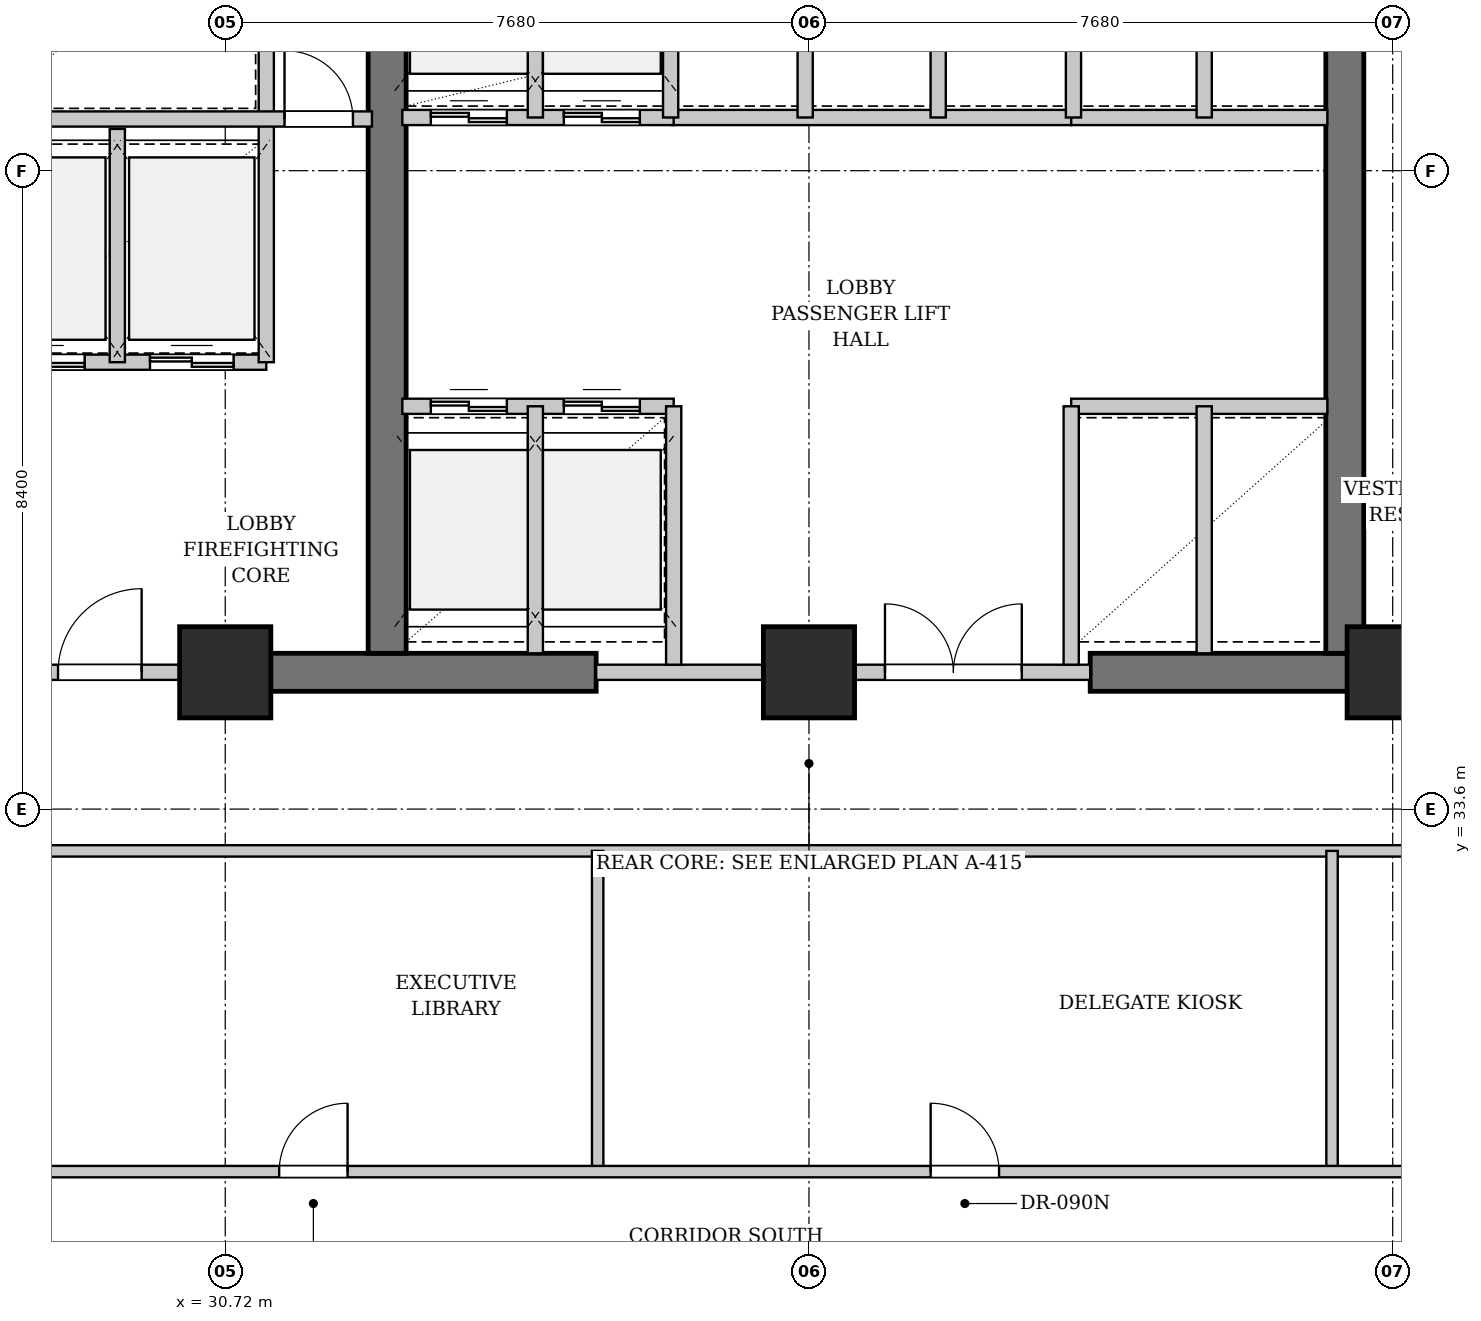
"""IFC4 building model, lengths in metres.
Left out: names, types, materials, properties, quantities, classifications, styles, units other than length and angle.
Written with IfcOpenShell. Run it as: python <this file> out.ifc"""

import sys

from ifc_helpers import new_model, si_unit, direction, frame, frame_2d, origin, origin_2d, place, context, subcontext, project, spatial, rectangle, extrude, element, fill, save


model = new_model("IFC4")
c1 = context("Model", 3, precision=1e-05, world=origin(), true_north=direction((0.0, 1.0)))
c2 = subcontext(c1, "Body", "Model", "MODEL_VIEW")
j1 = project(units=[si_unit("LENGTHUNIT", "METRE"), si_unit("PLANEANGLEUNIT", "RADIAN")], contexts=[c1])
p1 = place(None, origin())
s1 = spatial("IfcSite", under=j1, at=p1, CompositionType="ELEMENT")
p2 = place(p1, origin())
s2 = spatial("IfcBuilding", under=s1, at=p2, CompositionType="ELEMENT")
p3 = place(p2, frame((0.0, 0.0, 54.2)))
s3 = spatial("IfcBuildingStorey", under=s2, at=p3, CompositionType="ELEMENT", Elevation=54.2)
p4 = place(p3, frame((30.72, 35.4, 0.0), z_axis=(0.0, 0.0, 1.0), x_axis=(1.0, 0.0, 0.0)))
e1 = element("IfcWall", 1, at=p4, inside=s3, PredefinedType="SHEAR", context=c2, shape_type="SweptSolid", body=[
    extrude(rectangle(XDim=4.88, YDim=0.5, at=frame_2d((2.44, 0.0))), origin(), (0.0, 0.0, 1.0), 3.18),
])
p5 = place(p3, frame((42.1, 35.4, 0.0), z_axis=(0.0, 0.0, 1.0), x_axis=(1.0, 0.0, 0.0)))
e2 = element("IfcWall", 2, at=p5, inside=s3, PredefinedType="SHEAR", context=c2, shape_type="SweptSolid", body=[
    extrude(rectangle(XDim=8.05, YDim=0.5, at=frame_2d((4.025, 0.0))), origin(), (0.0, 0.0, 1.0), 3.18),
])
p6 = place(p5, frame((4.85, 0.0, 0.0)))
e3 = element("IfcOpeningElement", 3, at=p6, cuts=e2, PredefinedType="OPENING", context=c2, shape_type="SweptSolid", body=[
    extrude(rectangle(XDim=0.9, YDim=2.15, at=frame_2d((0.45, 1.075))), frame((0.0, 0.26, 0.0), z_axis=(0.0, -1.0, 0.0), x_axis=(1.0, 0.0, 0.0)), (0.0, 0.0, 1.0), 0.52),
])
for number, where, z_axis, x_axis in (
    (4, (32.85, 35.65, 0.0), (0.0, 0.0, 1.0), (0.0, 1.0, 0.0)),
    (5, (45.45, 35.65, 0.0), (0.0, 0.0, 1.0), (0.0, 1.0, 0.0)),
):
    element("IfcWall", number, at=place(p3, frame(where, z_axis=z_axis, x_axis=x_axis)), inside=s3, PredefinedType="SHEAR", context=c2, shape_type="SweptSolid", body=[
        extrude(rectangle(XDim=10.3, YDim=0.5, at=frame_2d((5.15, 0.0))), origin(), (0.0, 0.0, 1.0), 3.18),
    ])
for number, where, z_axis, x_axis in (
    (6, (30.72, 35.4, 0.0), (0.0, 0.0, 1.0), (1.0, 0.0, 0.0)),
    (7, (38.4, 35.4, 0.0), (0.0, 0.0, 1.0), (1.0, 0.0, 0.0)),
    (8, (46.08, 35.4, 0.0), (0.0, 0.0, 1.0), (1.0, 0.0, 0.0)),
):
    element("IfcColumn", number, at=place(p3, frame(where, z_axis=z_axis, x_axis=x_axis)), inside=s3, PredefinedType="COLUMN", context=c2, shape_type="SweptSolid", body=[
        extrude(rectangle(XDim=1.2, YDim=1.2, at=origin_2d()), origin(), (0.0, 0.0, 1.0), 3.4),
    ])
p7 = place(p3, frame((28.22, 35.4, 0.0), z_axis=(0.0, 0.0, 1.0), x_axis=(1.0, 0.0, 0.0)))
e9 = element("IfcWall", 9, at=p7, inside=s3, PredefinedType="PARTITIONING", context=c2, shape_type="SweptSolid", body=[
    extrude(rectangle(XDim=2.5, YDim=0.2, at=frame_2d((1.25, 0.0))), origin(), (0.0, 0.0, 1.0), 2.475),
])
p8 = place(p7, frame((0.3, 0.0, 0.0)))
e10 = element("IfcOpeningElement", 10, at=p8, cuts=e9, PredefinedType="OPENING", context=c2, shape_type="SweptSolid", body=[
    extrude(rectangle(XDim=1.1, YDim=2.15, at=frame_2d((0.55, 1.075))), frame((0.0, 0.11, 0.0), z_axis=(0.0, -1.0, 0.0), x_axis=(1.0, 0.0, 0.0)), (0.0, 0.0, 1.0), 0.22),
])
p9 = place(p3, frame((27.32, 39.48, 0.0), z_axis=(0.0, 0.0, 1.0), x_axis=(1.0, 0.0, 0.0)))
e11 = element("IfcWall", 11, at=p9, inside=s3, PredefinedType="PARTITIONING", context=c2, shape_type="SweptSolid", body=[
    extrude(rectangle(XDim=3.94, YDim=0.2, at=frame_2d((1.97, 0.0))), origin(), (0.0, 0.0, 1.0), 3.18),
])
p10 = place(p9, frame((0.45, 0.0, 0.0)))
e12 = element("IfcOpeningElement", 12, at=p10, cuts=e11, PredefinedType="OPENING", context=c2, shape_type="SweptSolid", body=[
    extrude(rectangle(XDim=1.1, YDim=2.2, at=frame_2d((0.55, 1.1))), frame((0.0, 0.11, 0.0), z_axis=(0.0, -1.0, 0.0), x_axis=(1.0, 0.0, 0.0)), (0.0, 0.0, 1.0), 0.22),
])
p11 = place(p9, frame((2.41, 0.0, 0.0)))
e13 = element("IfcOpeningElement", 13, at=p11, cuts=e11, PredefinedType="OPENING", context=c2, shape_type="SweptSolid", body=[
    extrude(rectangle(XDim=1.1, YDim=2.2, at=frame_2d((0.55, 1.1))), frame((0.0, 0.11, 0.0), z_axis=(0.0, -1.0, 0.0), x_axis=(1.0, 0.0, 0.0)), (0.0, 0.0, 1.0), 0.22),
])
p12 = place(p3, frame((29.3, 39.48, 0.0), z_axis=(0.0, 0.0, 1.0), x_axis=(0.0, 1.0, 0.0)))
e14 = element("IfcWall", 14, at=p12, inside=s3, PredefinedType="PARTITIONING", context=c2, shape_type="SweptSolid", body=[
    extrude(rectangle(XDim=3.07, YDim=0.2, at=frame_2d((1.535, 0.0))), origin(), (0.0, 0.0, 1.0), 3.18),
])
p13 = place(p3, frame((31.26, 39.48, 0.0), z_axis=(0.0, 0.0, 1.0), x_axis=(0.0, 1.0, 0.0)))
e15 = element("IfcWall", 15, at=p13, inside=s3, PredefinedType="PARTITIONING", context=c2, shape_type="SweptSolid", body=[
    extrude(rectangle(XDim=6.44, YDim=0.2, at=frame_2d((3.22, 0.0))), origin(), (0.0, 0.0, 1.0), 3.18),
])
p14 = place(p3, frame((27.32, 42.68, 0.0), z_axis=(0.0, 0.0, 1.0), x_axis=(1.0, 0.0, 0.0)))
e16 = element("IfcWall", 16, at=p14, inside=s3, PredefinedType="PARTITIONING", context=c2, shape_type="SweptSolid", body=[
    extrude(rectangle(XDim=5.33, YDim=0.2, at=frame_2d((2.665, 0.0))), origin(), (0.0, 0.0, 1.0), 3.18),
])
p15 = place(p14, frame((4.18, 0.0, 0.0)))
e17 = element("IfcOpeningElement", 17, at=p15, cuts=e16, PredefinedType="OPENING", context=c2, shape_type="SweptSolid", body=[
    extrude(rectangle(XDim=0.9, YDim=2.15, at=frame_2d((0.45, 1.075))), frame((0.0, 0.11, 0.0), z_axis=(0.0, -1.0, 0.0), x_axis=(1.0, 0.0, 0.0)), (0.0, 0.0, 1.0), 0.22),
])
p16 = place(p3, frame((35.6, 35.4, 0.0), z_axis=(0.0, 0.0, 1.0), x_axis=(1.0, 0.0, 0.0)))
e18 = element("IfcWall", 18, at=p16, inside=s3, PredefinedType="PARTITIONING", context=c2, shape_type="SweptSolid", body=[
    extrude(rectangle(XDim=6.5, YDim=0.2, at=frame_2d((3.25, 0.0))), origin(), (0.0, 0.0, 1.0), 2.475),
])
p17 = place(p16, frame((3.8, 0.0, 0.0)))
e19 = element("IfcOpeningElement", 19, at=p17, cuts=e18, PredefinedType="OPENING", context=c2, shape_type="SweptSolid", body=[
    extrude(rectangle(XDim=1.8, YDim=2.3, at=frame_2d((0.9, 1.15))), frame((0.0, 0.11, 0.0), z_axis=(0.0, -1.0, 0.0), x_axis=(1.0, 0.0, 0.0)), (0.0, 0.0, 1.0), 0.22),
])
p18 = place(p3, frame((36.6, 42.7, 0.0), z_axis=(0.0, 0.0, 1.0), x_axis=(1.0, 0.0, 0.0)))
e20 = element("IfcWall", 20, at=p18, inside=s3, PredefinedType="PARTITIONING", context=c2, shape_type="SweptSolid", body=[
    extrude(rectangle(XDim=5.25, YDim=0.2, at=frame_2d((2.625, 0.0))), origin(), (0.0, 0.0, 1.0), 3.18),
])
p19 = place(p3, frame((38.35, 42.7, 0.0), z_axis=(0.0, 0.0, 1.0), x_axis=(0.0, 1.0, 0.0)))
e21 = element("IfcWall", 21, at=p19, inside=s3, PredefinedType="PARTITIONING", context=c2, shape_type="SweptSolid", body=[
    extrude(rectangle(XDim=3.22, YDim=0.2, at=frame_2d((1.61, 0.0))), origin(), (0.0, 0.0, 1.0), 2.475),
])
p20 = place(p3, frame((40.1, 42.7, 0.0), z_axis=(0.0, 0.0, 1.0), x_axis=(0.0, 1.0, 0.0)))
e22 = element("IfcWall", 22, at=p20, inside=s3, PredefinedType="PARTITIONING", context=c2, shape_type="SweptSolid", body=[
    extrude(rectangle(XDim=3.22, YDim=0.2, at=frame_2d((1.61, 0.0))), origin(), (0.0, 0.0, 1.0), 3.18),
])
p21 = place(p3, frame((33.05, 38.9, 0.0), z_axis=(0.0, 0.0, 1.0), x_axis=(1.0, 0.0, 0.0)))
e23 = element("IfcWall", 23, at=p21, inside=s3, PredefinedType="PARTITIONING", context=c2, shape_type="SweptSolid", body=[
    extrude(rectangle(XDim=3.57, YDim=0.2, at=frame_2d((1.785, 0.0))), origin(), (0.0, 0.0, 1.0), 3.18),
])
p22 = place(p21, frame((0.375, 0.0, 0.0)))
e24 = element("IfcOpeningElement", 24, at=p22, cuts=e23, PredefinedType="OPENING", context=c2, shape_type="SweptSolid", body=[
    extrude(rectangle(XDim=1.0, YDim=2.2, at=frame_2d((0.5, 1.1))), frame((0.0, 0.11, 0.0), z_axis=(0.0, -1.0, 0.0), x_axis=(1.0, 0.0, 0.0)), (0.0, 0.0, 1.0), 0.22),
])
p23 = place(p21, frame((2.125, 0.0, 0.0)))
e25 = element("IfcOpeningElement", 25, at=p23, cuts=e23, PredefinedType="OPENING", context=c2, shape_type="SweptSolid", body=[
    extrude(rectangle(XDim=1.0, YDim=2.2, at=frame_2d((0.5, 1.1))), frame((0.0, 0.11, 0.0), z_axis=(0.0, -1.0, 0.0), x_axis=(1.0, 0.0, 0.0)), (0.0, 0.0, 1.0), 0.22),
])
p24 = place(p3, frame((33.05, 42.7, 0.0), z_axis=(0.0, 0.0, 1.0), x_axis=(1.0, 0.0, 0.0)))
e26 = element("IfcWall", 26, at=p24, inside=s3, PredefinedType="PARTITIONING", context=c2, shape_type="SweptSolid", body=[
    extrude(rectangle(XDim=3.57, YDim=0.2, at=frame_2d((1.785, 0.0))), origin(), (0.0, 0.0, 1.0), 3.18),
])
p25 = place(p24, frame((0.375, 0.0, 0.0)))
e27 = element("IfcOpeningElement", 27, at=p25, cuts=e26, PredefinedType="OPENING", context=c2, shape_type="SweptSolid", body=[
    extrude(rectangle(XDim=1.0, YDim=2.2, at=frame_2d((0.5, 1.1))), frame((0.0, 0.11, 0.0), z_axis=(0.0, -1.0, 0.0), x_axis=(1.0, 0.0, 0.0)), (0.0, 0.0, 1.0), 0.22),
])
p26 = place(p24, frame((2.125, 0.0, 0.0)))
e28 = element("IfcOpeningElement", 28, at=p26, cuts=e26, PredefinedType="OPENING", context=c2, shape_type="SweptSolid", body=[
    extrude(rectangle(XDim=1.0, YDim=2.2, at=frame_2d((0.5, 1.1))), frame((0.0, 0.11, 0.0), z_axis=(0.0, -1.0, 0.0), x_axis=(1.0, 0.0, 0.0)), (0.0, 0.0, 1.0), 0.22),
])
p27 = place(p3, frame((34.8, 35.65, 0.0), z_axis=(0.0, 0.0, 1.0), x_axis=(0.0, 1.0, 0.0)))
e29 = element("IfcWall", 29, at=p27, inside=s3, PredefinedType="PARTITIONING", context=c2, shape_type="SweptSolid", body=[
    extrude(rectangle(XDim=3.25, YDim=0.2, at=frame_2d((1.625, 0.0))), origin(), (0.0, 0.0, 1.0), 3.18),
])
p28 = place(p3, frame((34.8, 42.7, 0.0), z_axis=(0.0, 0.0, 1.0), x_axis=(0.0, 1.0, 0.0)))
e30 = element("IfcWall", 30, at=p28, inside=s3, PredefinedType="PARTITIONING", context=c2, shape_type="SweptSolid", body=[
    extrude(rectangle(XDim=3.22, YDim=0.2, at=frame_2d((1.61, 0.0))), origin(), (0.0, 0.0, 1.0), 3.18),
])
p29 = place(p3, frame((36.62, 35.5, 0.0), z_axis=(0.0, 0.0, 1.0), x_axis=(0.0, 1.0, 0.0)))
e31 = element("IfcWall", 31, at=p29, inside=s3, PredefinedType="PARTITIONING", context=c2, shape_type="SweptSolid", body=[
    extrude(rectangle(XDim=3.4, YDim=0.2, at=frame_2d((1.7, 0.0))), origin(), (0.0, 0.0, 1.0), 3.18),
])
p30 = place(p3, frame((36.58, 42.7, 0.0), z_axis=(0.0, 0.0, 1.0), x_axis=(0.0, 1.0, 0.0)))
e32 = element("IfcWall", 32, at=p30, inside=s3, PredefinedType="PARTITIONING", context=c2, shape_type="SweptSolid", body=[
    extrude(rectangle(XDim=3.22, YDim=0.2, at=frame_2d((1.61, 0.0))), origin(), (0.0, 0.0, 1.0), 3.18),
])
for number, where, z_axis, x_axis in (
    (33, (41.85, 38.9, 0.0), (0.0, 0.0, 1.0), (1.0, 0.0, 0.0)),
    (34, (41.85, 42.7, 0.0), (0.0, 0.0, 1.0), (1.0, 0.0, 0.0)),
):
    element("IfcWall", number, at=place(p3, frame(where, z_axis=z_axis, x_axis=x_axis)), inside=s3, PredefinedType="PARTITIONING", context=c2, shape_type="SweptSolid", body=[
        extrude(rectangle(XDim=3.37, YDim=0.2, at=frame_2d((1.685, 0.0))), origin(), (0.0, 0.0, 1.0), 3.18),
    ])
p31 = place(p3, frame((43.6, 35.65, 0.0), z_axis=(0.0, 0.0, 1.0), x_axis=(0.0, 1.0, 0.0)))
e35 = element("IfcWall", 35, at=p31, inside=s3, PredefinedType="PARTITIONING", context=c2, shape_type="SweptSolid", body=[
    extrude(rectangle(XDim=3.25, YDim=0.2, at=frame_2d((1.625, 0.0))), origin(), (0.0, 0.0, 1.0), 3.18),
])
p32 = place(p3, frame((43.6, 42.7, 0.0), z_axis=(0.0, 0.0, 1.0), x_axis=(0.0, 1.0, 0.0)))
e36 = element("IfcWall", 36, at=p32, inside=s3, PredefinedType="PARTITIONING", context=c2, shape_type="SweptSolid", body=[
    extrude(rectangle(XDim=3.22, YDim=0.2, at=frame_2d((1.61, 0.0))), origin(), (0.0, 0.0, 1.0), 3.18),
])
p33 = place(p3, frame((41.85, 35.5, 0.0), z_axis=(0.0, 0.0, 1.0), x_axis=(0.0, 1.0, 0.0)))
e37 = element("IfcWall", 37, at=p33, inside=s3, PredefinedType="PARTITIONING", context=c2, shape_type="SweptSolid", body=[
    extrude(rectangle(XDim=3.4, YDim=0.2, at=frame_2d((1.7, 0.0))), origin(), (0.0, 0.0, 1.0), 3.18),
])
p34 = place(p3, frame((41.88, 42.7, 0.0), z_axis=(0.0, 0.0, 1.0), x_axis=(0.0, 1.0, 0.0)))
e38 = element("IfcWall", 38, at=p34, inside=s3, PredefinedType="PARTITIONING", context=c2, shape_type="SweptSolid", body=[
    extrude(rectangle(XDim=3.22, YDim=0.2, at=frame_2d((1.61, 0.0))), origin(), (0.0, 0.0, 1.0), 3.18),
])
p35 = place(p3, frame((22.83, 33.05, 0.0), z_axis=(0.0, 0.0, 1.0), x_axis=(1.0, 0.0, 0.0)))
e39 = element("IfcWall", 39, at=p35, inside=s3, PredefinedType="PARTITIONING", context=c2, shape_type="SweptSolid", body=[
    extrude(rectangle(XDim=31.19, YDim=0.15, at=frame_2d((15.595, 0.0))), origin(), (0.0, 0.0, 1.0), 3.18),
])
for number, where, z_axis, x_axis in (
    (40, (35.62, 28.83, 0.0), (0.0, 0.0, 1.0), (0.0, 1.0, 0.0)),
    (41, (45.282, 28.83, 0.0), (0.0, 0.0, 1.0), (0.0, 1.0, 0.0)),
):
    element("IfcWall", number, at=place(p3, frame(where, z_axis=z_axis, x_axis=x_axis)), inside=s3, PredefinedType="PARTITIONING", context=c2, shape_type="SweptSolid", body=[
        extrude(rectangle(XDim=4.22, YDim=0.15, at=frame_2d((2.11, 0.0))), origin(), (0.0, 0.0, 1.0), 3.18),
    ])
p36 = place(p3, frame((22.84, 28.83, 0.0), z_axis=(0.0, 0.0, 1.0), x_axis=(1.0, 0.0, 0.0)))
e42 = element("IfcWall", 42, at=p36, inside=s3, PredefinedType="PARTITIONING", context=c2, shape_type="SweptSolid", body=[
    extrude(rectangle(XDim=31.17, YDim=0.15, at=frame_2d((15.585, 0.0))), origin(), (0.0, 0.0, 1.0), 3.18),
])
p37 = place(p36, frame((2.199, 0.0, 0.0)))
e43 = element("IfcOpeningElement", 43, at=p37, cuts=e42, PredefinedType="OPENING", context=c2, shape_type="SweptSolid", body=[
    extrude(rectangle(XDim=0.9, YDim=2.15, at=frame_2d((0.45, 1.075))), frame((0.0, 0.085, 0.0), z_axis=(0.0, -1.0, 0.0), x_axis=(1.0, 0.0, 0.0)), (0.0, 0.0, 1.0), 0.17),
])
p38 = place(p36, frame((8.59, 0.0, 0.0)))
e44 = element("IfcOpeningElement", 44, at=p38, cuts=e42, PredefinedType="OPENING", context=c2, shape_type="SweptSolid", body=[
    extrude(rectangle(XDim=0.9, YDim=2.15, at=frame_2d((0.45, 1.075))), frame((0.0, 0.085, 0.0), z_axis=(0.0, -1.0, 0.0), x_axis=(1.0, 0.0, 0.0)), (0.0, 0.0, 1.0), 0.17),
])
p39 = place(p36, frame((17.161, 0.0, 0.0)))
e45 = element("IfcOpeningElement", 45, at=p39, cuts=e42, PredefinedType="OPENING", context=c2, shape_type="SweptSolid", body=[
    extrude(rectangle(XDim=0.9, YDim=2.15, at=frame_2d((0.45, 1.075))), frame((0.0, 0.085, 0.0), z_axis=(0.0, -1.0, 0.0), x_axis=(1.0, 0.0, 0.0)), (0.0, 0.0, 1.0), 0.17),
])
p40 = place(p36, frame((26.356, 0.0, 0.0)))
e46 = element("IfcOpeningElement", 46, at=p40, cuts=e42, PredefinedType="OPENING", context=c2, shape_type="SweptSolid", body=[
    extrude(rectangle(XDim=0.9, YDim=2.15, at=frame_2d((0.45, 1.075))), frame((0.0, 0.085, 0.0), z_axis=(0.0, -1.0, 0.0), x_axis=(1.0, 0.0, 0.0)), (0.0, 0.0, 1.0), 0.17),
])
p41 = place(p8, origin())
e47 = element("IfcDoor", 47, at=p41, inside=s3, OperationType="SINGLE_SWING_RIGHT", PredefinedType="DOOR", context=c2, shape_type="SweptSolid", body=[
    extrude(rectangle(XDim=1.1, YDim=2.15, at=frame_2d((0.55, 1.075))), frame((0.0, 0.025, 0.0), z_axis=(0.0, -1.0, 0.0), x_axis=(1.0, 0.0, 0.0)), (0.0, 0.0, 1.0), 0.05),
])
fill(e10, e47)
p42 = place(p10, origin())
e48 = element("IfcDoor", 48, at=p42, inside=s3, OperationType="DOUBLE_DOOR_SLIDING", PredefinedType="DOOR", context=c2, shape_type="SweptSolid", body=[
    extrude(rectangle(XDim=1.1, YDim=2.2, at=frame_2d((0.55, 1.1))), frame((0.0, 0.025, 0.0), z_axis=(0.0, -1.0, 0.0), x_axis=(1.0, 0.0, 0.0)), (0.0, 0.0, 1.0), 0.05),
])
fill(e12, e48)
p43 = place(p11, origin())
e49 = element("IfcDoor", 49, at=p43, inside=s3, OperationType="DOUBLE_DOOR_SLIDING", PredefinedType="DOOR", context=c2, shape_type="SweptSolid", body=[
    extrude(rectangle(XDim=1.1, YDim=2.2, at=frame_2d((0.55, 1.1))), frame((0.0, 0.025, 0.0), z_axis=(0.0, -1.0, 0.0), x_axis=(1.0, 0.0, 0.0)), (0.0, 0.0, 1.0), 0.05),
])
fill(e13, e49)
p44 = place(p15, origin())
e50 = element("IfcDoor", 50, at=p44, inside=s3, OperationType="SINGLE_SWING_LEFT", PredefinedType="DOOR", context=c2, shape_type="SweptSolid", body=[
    extrude(rectangle(XDim=0.9, YDim=2.15, at=frame_2d((0.45, 1.075))), frame((0.0, 0.025, 0.0), z_axis=(0.0, -1.0, 0.0), x_axis=(1.0, 0.0, 0.0)), (0.0, 0.0, 1.0), 0.05),
])
fill(e17, e50)
p45 = place(p17, origin())
e51 = element("IfcDoor", 51, at=p45, inside=s3, OperationType="DOUBLE_DOOR_SINGLE_SWING", PredefinedType="DOOR", context=c2, shape_type="SweptSolid", body=[
    extrude(rectangle(XDim=1.8, YDim=2.3, at=frame_2d((0.9, 1.15))), frame((0.0, 0.025, 0.0), z_axis=(0.0, -1.0, 0.0), x_axis=(1.0, 0.0, 0.0)), (0.0, 0.0, 1.0), 0.05),
])
fill(e19, e51)
p46 = place(p22, origin())
e52 = element("IfcDoor", 52, at=p46, inside=s3, OperationType="DOUBLE_DOOR_SLIDING", PredefinedType="DOOR", context=c2, shape_type="SweptSolid", body=[
    extrude(rectangle(XDim=1.0, YDim=2.2, at=frame_2d((0.5, 1.1))), frame((0.0, 0.025, 0.0), z_axis=(0.0, -1.0, 0.0), x_axis=(1.0, 0.0, 0.0)), (0.0, 0.0, 1.0), 0.05),
])
fill(e24, e52)
p47 = place(p23, origin())
e53 = element("IfcDoor", 53, at=p47, inside=s3, OperationType="DOUBLE_DOOR_SLIDING", PredefinedType="DOOR", context=c2, shape_type="SweptSolid", body=[
    extrude(rectangle(XDim=1.0, YDim=2.2, at=frame_2d((0.5, 1.1))), frame((0.0, 0.025, 0.0), z_axis=(0.0, -1.0, 0.0), x_axis=(1.0, 0.0, 0.0)), (0.0, 0.0, 1.0), 0.05),
])
fill(e25, e53)
p48 = place(p25, origin())
e54 = element("IfcDoor", 54, at=p48, inside=s3, OperationType="DOUBLE_DOOR_SLIDING", PredefinedType="DOOR", context=c2, shape_type="SweptSolid", body=[
    extrude(rectangle(XDim=1.0, YDim=2.2, at=frame_2d((0.5, 1.1))), frame((0.0, 0.025, 0.0), z_axis=(0.0, -1.0, 0.0), x_axis=(1.0, 0.0, 0.0)), (0.0, 0.0, 1.0), 0.05),
])
fill(e27, e54)
p49 = place(p26, origin())
e55 = element("IfcDoor", 55, at=p49, inside=s3, OperationType="DOUBLE_DOOR_SLIDING", PredefinedType="DOOR", context=c2, shape_type="SweptSolid", body=[
    extrude(rectangle(XDim=1.0, YDim=2.2, at=frame_2d((0.5, 1.1))), frame((0.0, 0.025, 0.0), z_axis=(0.0, -1.0, 0.0), x_axis=(1.0, 0.0, 0.0)), (0.0, 0.0, 1.0), 0.05),
])
fill(e28, e55)
p50 = place(p38, origin())
e56 = element("IfcDoor", 56, at=p50, inside=s3, OperationType="SINGLE_SWING_RIGHT", PredefinedType="DOOR", context=c2, shape_type="SweptSolid", body=[
    extrude(rectangle(XDim=0.9, YDim=2.15, at=frame_2d((0.45, 1.075))), frame((0.0, 0.025, 0.0), z_axis=(0.0, -1.0, 0.0), x_axis=(1.0, 0.0, 0.0)), (0.0, 0.0, 1.0), 0.05),
])
fill(e44, e56)
p51 = place(p39, origin())
e57 = element("IfcDoor", 57, at=p51, inside=s3, OperationType="SINGLE_SWING_LEFT", PredefinedType="DOOR", context=c2, shape_type="SweptSolid", body=[
    extrude(rectangle(XDim=0.9, YDim=2.15, at=frame_2d((0.45, 1.075))), frame((0.0, 0.025, 0.0), z_axis=(0.0, -1.0, 0.0), x_axis=(1.0, 0.0, 0.0)), (0.0, 0.0, 1.0), 0.05),
])
fill(e45, e57)
save(model, sys.argv[1])
